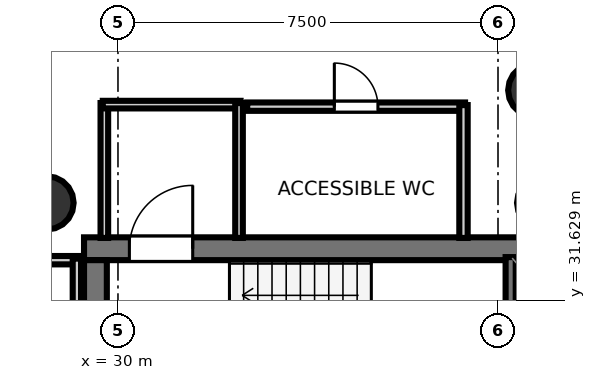
"""IFC4 building model, lengths in metres.
Left out: names, types, materials, properties, quantities, classifications, styles, units other than length and angle.
Written with IfcOpenShell. Run it as: python <this file> out.ifc"""

import sys

from ifc_helpers import new_model, si_unit, direction, frame, frame_2d, origin, origin_2d, place, context, subcontext, project, spatial, rectangle, hollow_circle, extrude, element, fill, save


model = new_model("IFC4")
c1 = context("Model", 3, precision=1e-05, world=origin(), true_north=direction((0.0, 1.0)))
c2 = subcontext(c1, "Body", "Model", "MODEL_VIEW")
j1 = project(units=[si_unit("LENGTHUNIT", "METRE"), si_unit("PLANEANGLEUNIT", "RADIAN")], contexts=[c1])
p1 = place(None, origin())
s1 = spatial("IfcSite", under=j1, at=p1, CompositionType="ELEMENT")
p2 = place(p1, origin())
s2 = spatial("IfcBuilding", under=s1, at=p2, CompositionType="ELEMENT")
p3 = place(p2, frame((0.0, 0.0, 239.0)))
s3 = spatial("IfcBuildingStorey", under=s2, at=p3, CompositionType="ELEMENT", Elevation=239.0)
p4 = place(p3, frame((29.33, 32.645, 0.0), z_axis=(0.0, 0.0, 1.0), x_axis=(1.0, 0.0, 0.0)))
e1 = element("IfcWall", 1, at=p4, inside=s3, PredefinedType="SHEAR", context=c2, shape_type="SweptSolid", body=[
    extrude(rectangle(XDim=10.52, YDim=0.45, at=frame_2d((5.26, 0.0))), origin(), (0.0, 0.0, 1.0), 3.52),
])
p5 = place(p4, frame((0.895, 0.0, 0.0)))
e2 = element("IfcOpeningElement", 2, at=p5, cuts=e1, PredefinedType="OPENING", context=c2, shape_type="SweptSolid", body=[
    extrude(rectangle(XDim=1.25, YDim=2.15, at=frame_2d((0.625, 1.075))), frame((0.0, 0.235, 0.0), z_axis=(0.0, -1.0, 0.0), x_axis=(1.0, 0.0, 0.0)), (0.0, 0.0, 1.0), 0.47),
])
p6 = place(p3, frame((29.555, 24.98, 0.0), z_axis=(0.0, 0.0, 1.0), x_axis=(0.0, 1.0, 0.0)))
e3 = element("IfcWall", 3, at=p6, inside=s3, PredefinedType="SHEAR", context=c2, shape_type="SweptSolid", body=[
    extrude(rectangle(XDim=7.44, YDim=0.45, at=frame_2d((3.72, 0.0))), origin(), (0.0, 0.0, 1.0), 3.52),
])
for number, where, z_axis, x_axis in (
    (4, (28.6, 33.55, 0.0), (0.0, 0.0, 1.0), (1.0, 0.0, 0.0)),
    (5, (38.225, 35.773, 0.0), (0.0, 0.0, 1.0), (1.0, 0.0, 0.0)),
):
    element("IfcColumn", number, at=place(p3, frame(where, z_axis=z_axis, x_axis=x_axis)), inside=s3, PredefinedType="COLUMN", context=c2, shape_type="SweptSolid", body=[
        extrude(hollow_circle(Radius=0.525, WallThickness=0.028, at=origin_2d()), origin(), (0.0, 0.0, 1.0), 3.7),
    ])
p7 = place(p3, frame((37.75, 30.12, 0.0), z_axis=(0.0, 0.0, 1.0), x_axis=(0.0, 1.0, 0.0)))
e6 = element("IfcWall", 6, at=p7, inside=s3, PredefinedType="SOLIDWALL", context=c2, shape_type="SweptSolid", body=[
    extrude(rectangle(XDim=2.36, YDim=0.2, at=frame_2d((1.18, 0.0))), origin(), (0.0, 0.0, 1.0), 3.52),
])
p8 = place(p3, frame((29.731, 32.858, 0.0), z_axis=(0.0, 0.0, 1.0), x_axis=(0.0, 1.0, 0.0)))
e7 = element("IfcWall", 7, at=p8, inside=s3, PredefinedType="PARTITIONING", context=c2, shape_type="SweptSolid", body=[
    extrude(rectangle(XDim=2.662, YDim=0.15, at=frame_2d((1.331, 0.0))), origin(), (0.0, 0.0, 1.0), 2.84),
])
p9 = place(p3, frame((29.7, 35.489, 0.0), z_axis=(0.0, 0.0, 1.0), x_axis=(1.0, 0.0, 0.0)))
e8 = element("IfcWall", 8, at=p9, inside=s3, PredefinedType="PARTITIONING", context=c2, shape_type="SweptSolid", body=[
    extrude(rectangle(XDim=2.72, YDim=0.15, at=frame_2d((1.36, 0.0))), origin(), (0.0, 0.0, 1.0), 2.84),
])
p10 = place(p3, frame((32.389, 35.52, 0.0), z_axis=(0.0, 0.0, 1.0), x_axis=(0.0, -1.0, 0.0)))
e9 = element("IfcWall", 9, at=p10, inside=s3, PredefinedType="PARTITIONING", context=c2, shape_type="SweptSolid", body=[
    extrude(rectangle(XDim=2.662, YDim=0.15, at=frame_2d((1.331, 0.0))), origin(), (0.0, 0.0, 1.0), 2.84),
])
p11 = place(p3, frame((32.55, 35.449, 0.0), z_axis=(0.0, 0.0, 1.0), x_axis=(1.0, 0.0, 0.0)))
e10 = element("IfcWall", 10, at=p11, inside=s3, PredefinedType="PLUMBINGWALL", context=c2, shape_type="SweptSolid", body=[
    extrude(rectangle(XDim=4.3, YDim=0.165, at=frame_2d((2.15, 0.0))), origin(), (0.0, 0.0, 1.0), 2.84),
])
p12 = place(p11, frame((1.72, 0.0, 0.0)))
e11 = element("IfcOpeningElement", 11, at=p12, cuts=e10, PredefinedType="OPENING", context=c2, shape_type="SweptSolid", body=[
    extrude(rectangle(XDim=0.86, YDim=2.05, at=frame_2d((0.43, 1.025))), frame((0.0, 0.093, 0.0), z_axis=(0.0, -1.0, 0.0), x_axis=(1.0, 0.0, 0.0)), (0.0, 0.0, 1.0), 0.185),
])
p13 = place(p3, frame((36.819, 35.48, 0.0), z_axis=(0.0, 0.0, 1.0), x_axis=(0.0, -1.0, 0.0)))
e12 = element("IfcWall", 12, at=p13, inside=s3, PredefinedType="PLUMBINGWALL", context=c2, shape_type="SweptSolid", body=[
    extrude(rectangle(XDim=2.622, YDim=0.165, at=frame_2d((1.311, 0.0))), origin(), (0.0, 0.0, 1.0), 2.84),
])
p14 = place(p3, frame((27.72, 32.419, 0.0), z_axis=(0.0, 0.0, 1.0), x_axis=(1.0, 0.0, 0.0)))
e13 = element("IfcWall", 13, at=p14, inside=s3, PredefinedType="PLUMBINGWALL", context=c2, shape_type="SweptSolid", body=[
    extrude(rectangle(XDim=1.5, YDim=0.165, at=frame_2d((0.75, 0.0))), origin(), (0.0, 0.0, 1.0), 2.84),
])
p15 = place(p3, frame((29.189, 32.45, 0.0), z_axis=(0.0, 0.0, 1.0), x_axis=(0.0, -1.0, 0.0)))
e14 = element("IfcWall", 14, at=p15, inside=s3, PredefinedType="PLUMBINGWALL", context=c2, shape_type="SweptSolid", body=[
    extrude(rectangle(XDim=3.97, YDim=0.165, at=frame_2d((1.985, 0.0))), origin(), (0.0, 0.0, 1.0), 2.84),
])
p16 = place(p5, origin())
e15 = element("IfcDoor", 15, at=p16, inside=s3, OperationType="SINGLE_SWING_RIGHT", PredefinedType="DOOR", context=c2, shape_type="SweptSolid", body=[
    extrude(rectangle(XDim=1.25, YDim=2.15, at=frame_2d((0.625, 1.075))), frame((0.0, 0.025, 0.0), z_axis=(0.0, -1.0, 0.0), x_axis=(1.0, 0.0, 0.0)), (0.0, 0.0, 1.0), 0.05),
])
fill(e2, e15)
p17 = place(p12, origin())
e16 = element("IfcDoor", 16, at=p17, inside=s3, OperationType="SINGLE_SWING_LEFT", PredefinedType="DOOR", context=c2, shape_type="SweptSolid", body=[
    extrude(rectangle(XDim=0.86, YDim=2.05, at=frame_2d((0.43, 1.025))), frame((0.0, 0.025, 0.0), z_axis=(0.0, -1.0, 0.0), x_axis=(1.0, 0.0, 0.0)), (0.0, 0.0, 1.0), 0.05),
])
fill(e11, e16)
save(model, sys.argv[1])
